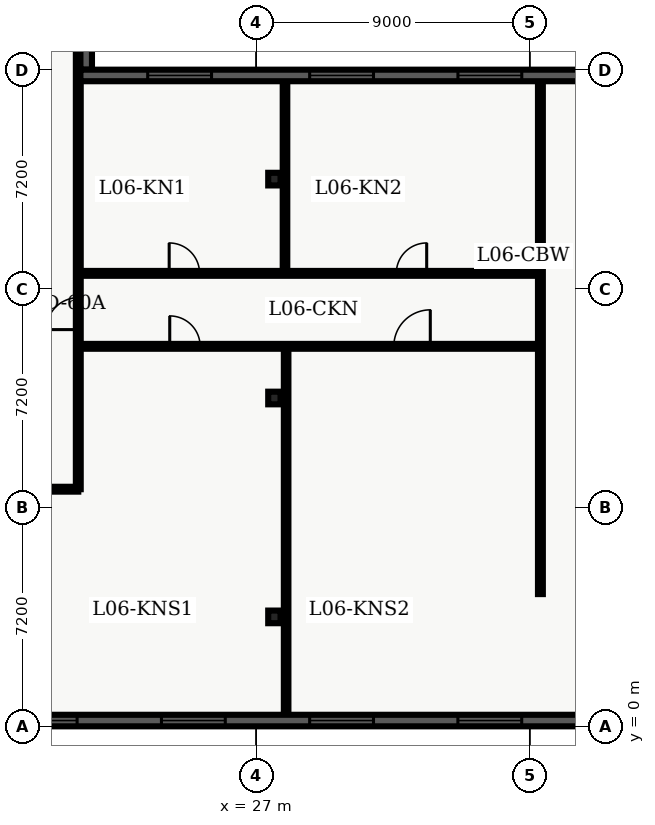
"""IFC4 building model, lengths in metres.
Left out: names, types, materials, properties, quantities, classifications, styles, units other than length and angle.
Written with IfcOpenShell. Run it as: python <this file> out.ifc"""

import sys

from ifc_helpers import new_model, entity, si_unit, converted_unit, direction, frame, origin_with_axes, origin_2d_with_axis, place, context, subcontext, project, spatial, polyline, rectangle, i_section, outline, extrude, element, fill, save


model = new_model("IFC4")
c1 = context("Model", 3, precision=1e-05, world=origin_with_axes(), true_north=direction((0.0, 1.0)))
c2 = subcontext(c1, "Body", "Model", "MODEL_VIEW")
j1 = project(units=[si_unit("LENGTHUNIT", "METRE"), converted_unit("PLANEANGLEUNIT", "DEGREE", entity("IfcPlaneAngleMeasure", 0.017), si_unit("PLANEANGLEUNIT", "RADIAN"), dimensions=[0, 0, 0, 0, 0, 0, 0])], contexts=[c1])
p1 = place(None, origin_with_axes())
s1 = spatial("IfcSite", under=j1, at=p1, CompositionType="ELEMENT")
p2 = place(p1, origin_with_axes())
s2 = spatial("IfcBuilding", under=s1, at=p2, CompositionType="ELEMENT")
p3 = place(p2, frame((0.0, 0.0, 28.8), z_axis=(0.0, 0.0, 1.0), x_axis=(1.0, 0.0, 0.0)))
s3 = spatial("IfcBuildingStorey", under=s2, at=p3, CompositionType="ELEMENT", Elevation=28.8)
for number, where, z_axis, x_axis in (
    (1, (27.6, 3.6, 0.0), (0.0, 0.0, 1.0), (1.0, 0.0, 0.0)),
    (2, (27.6, 10.8, 0.0), (0.0, 0.0, 1.0), (1.0, 0.0, 0.0)),
    (3, (27.6, 18.0, 0.0), (0.0, 0.0, 1.0), (1.0, 0.0, 0.0)),
):
    element("IfcColumn", number, at=place(p3, frame(where, z_axis=z_axis, x_axis=x_axis)), inside=s3, PredefinedType="COLUMN", context=c2, shape_type="SweptSolid", body=[
        extrude(i_section(OverallWidth=0.406, OverallDepth=0.416, WebThickness=0.03, FlangeThickness=0.048, FilletRadius=0.022, at=origin_2d_with_axis()), origin_with_axes(), (0.0, 0.0, 1.0), 3.9),
    ])
p4 = place(p3, frame((2.6, 7.8, 0.0), z_axis=(0.0, 0.0, 1.0), x_axis=(1.0, 0.0, 0.0)))
e4 = element("IfcWall", 4, at=p4, inside=s3, PredefinedType="PARTITIONING", context=c2, shape_type="SweptSolid", body=[
    extrude(outline(polyline([(0.0, -0.08), (18.55, -0.08), (18.55, 0.08), (0.0, 0.08), (0.0, -0.08)])), origin_with_axes(), (0.0, 0.0, 1.0), 2.7),
])
p5 = place(p4, frame((3.765, 0.0, 0.0), z_axis=(0.0, 0.0, 1.0), x_axis=(1.0, 0.0, 0.0)))
e5 = element("IfcOpeningElement", 5, at=p5, cuts=e4, PredefinedType="OPENING", context=c2, shape_type="SweptSolid", body=[
    extrude(rectangle(XDim=1.0, YDim=0.18, at=origin_2d_with_axis()), origin_with_axes(), (0.0, 0.0, 1.0), 2.15),
])
p6 = place(p4, frame((13.3, 0.0, 0.0), z_axis=(0.0, 0.0, 1.0), x_axis=(1.0, 0.0, 0.0)))
e6 = element("IfcOpeningElement", 6, at=p6, cuts=e4, PredefinedType="OPENING", context=c2, shape_type="SweptSolid", body=[
    extrude(rectangle(XDim=1.0, YDim=0.18, at=origin_2d_with_axis()), origin_with_axes(), (0.0, 0.0, 1.0), 2.15),
])
p7 = place(p3, frame((21.15, 7.8, 0.0), z_axis=(0.0, 0.0, 1.0), x_axis=(0.0, 1.0, 0.0)))
e7 = element("IfcWall", 7, at=p7, inside=s3, PredefinedType="PARTITIONING", context=c2, shape_type="SweptSolid", body=[
    extrude(outline(polyline([(0.0, -0.08), (30.2, -0.08), (30.2, 0.08), (0.0, 0.08), (0.0, -0.08)])), origin_with_axes(), (0.0, 0.0, 1.0), 2.7),
])
p8 = place(p7, frame((5.775, 0.0, 0.0), z_axis=(0.0, 0.0, 1.0), x_axis=(1.0, 0.0, 0.0)))
e8 = element("IfcOpeningElement", 8, at=p8, cuts=e7, PredefinedType="OPENING", context=c2, shape_type="SweptSolid", body=[
    extrude(rectangle(XDim=1.05, YDim=0.18, at=origin_2d_with_axis()), origin_with_axes(), (0.0, 0.0, 1.0), 2.15),
])
p9 = place(p3, frame((21.15, 12.5, 0.0), z_axis=(0.0, 0.0, 1.0), x_axis=(1.0, 0.0, 0.0)))
e9 = element("IfcWall", 9, at=p9, inside=s3, PredefinedType="PARTITIONING", context=c2, shape_type="SweptSolid", body=[
    extrude(outline(polyline([(0.0, -0.08), (15.2, -0.08), (15.2, 0.08), (0.0, 0.08), (0.0, -0.08)])), origin_with_axes(), (0.0, 0.0, 1.0), 2.7),
])
p10 = place(p9, frame((3.508, 0.0, 0.0), z_axis=(0.0, 0.0, 1.0), x_axis=(1.0, 0.0, 0.0)))
e10 = element("IfcOpeningElement", 10, at=p10, cuts=e9, PredefinedType="OPENING", context=c2, shape_type="SweptSolid", body=[
    extrude(rectangle(XDim=1.0, YDim=0.18, at=origin_2d_with_axis()), origin_with_axes(), (0.0, 0.0, 1.0), 2.15),
])
p11 = place(p9, frame((10.978, 0.0, 0.0), z_axis=(0.0, 0.0, 1.0), x_axis=(1.0, 0.0, 0.0)))
e11 = element("IfcOpeningElement", 11, at=p11, cuts=e9, PredefinedType="OPENING", context=c2, shape_type="SweptSolid", body=[
    extrude(rectangle(XDim=1.2, YDim=0.18, at=origin_2d_with_axis()), origin_with_axes(), (0.0, 0.0, 1.0), 2.2),
])
p12 = place(p3, frame((21.15, 14.9, 0.0), z_axis=(0.0, 0.0, 1.0), x_axis=(1.0, 0.0, 0.0)))
e12 = element("IfcWall", 12, at=p12, inside=s3, PredefinedType="PARTITIONING", context=c2, shape_type="SweptSolid", body=[
    extrude(outline(polyline([(0.0, -0.08), (15.2, -0.08), (15.2, 0.08), (0.0, 0.08), (0.0, -0.08)])), origin_with_axes(), (0.0, 0.0, 1.0), 2.7),
])
p13 = place(p12, frame((3.49, 0.0, 0.0), z_axis=(0.0, 0.0, 1.0), x_axis=(1.0, 0.0, 0.0)))
e13 = element("IfcOpeningElement", 13, at=p13, cuts=e12, PredefinedType="OPENING", context=c2, shape_type="SweptSolid", body=[
    extrude(rectangle(XDim=1.0, YDim=0.18, at=origin_2d_with_axis()), origin_with_axes(), (0.0, 0.0, 1.0), 2.15),
])
p14 = place(p12, frame((10.96, 0.0, 0.0), z_axis=(0.0, 0.0, 1.0), x_axis=(1.0, 0.0, 0.0)))
e14 = element("IfcOpeningElement", 14, at=p14, cuts=e12, PredefinedType="OPENING", context=c2, shape_type="SweptSolid", body=[
    extrude(rectangle(XDim=1.0, YDim=0.18, at=origin_2d_with_axis()), origin_with_axes(), (0.0, 0.0, 1.0), 2.15),
])
p15 = place(p3, frame((36.35, 4.35, 0.0), z_axis=(0.0, 0.0, 1.0), x_axis=(0.0, 1.0, 0.0)))
e15 = element("IfcWall", 15, at=p15, inside=s3, PredefinedType="PARTITIONING", context=c2, shape_type="SweptSolid", body=[
    extrude(outline(polyline([(0.0, -0.08), (16.95, -0.08), (16.95, 0.08), (0.0, 0.08), (0.0, -0.08)])), origin_with_axes(), (0.0, 0.0, 1.0), 2.7),
])
p16 = place(p3, frame((27.986, 0.36, 0.0), z_axis=(0.0, 0.0, 1.0), x_axis=(0.0, 1.0, 0.0)))
e16 = element("IfcWall", 16, at=p16, inside=s3, PredefinedType="PARTITIONING", context=c2, shape_type="SweptSolid", body=[
    extrude(outline(polyline([(0.0, -0.075), (12.02, -0.075), (12.02, 0.075), (0.0, 0.075), (0.0, -0.075)])), origin_with_axes(), (0.0, 0.0, 1.0), 2.7),
])
p17 = place(p3, frame((27.949, 15.02, 0.0), z_axis=(0.0, 0.0, 1.0), x_axis=(0.0, 1.0, 0.0)))
e17 = element("IfcWall", 17, at=p17, inside=s3, PredefinedType="PARTITIONING", context=c2, shape_type="SweptSolid", body=[
    extrude(outline(polyline([(0.0, -0.075), (6.205, -0.075), (6.205, 0.075), (0.0, 0.075), (0.0, -0.075)])), origin_with_axes(), (0.0, 0.0, 1.0), 2.7),
])
p18 = place(p3, frame((57.22, 0.19, 0.0), z_axis=(0.0, 0.0, 1.0), x_axis=(-1.0, 0.0, 0.0)))
e18 = element("IfcWall", 18, at=p18, inside=s3, PredefinedType="SOLIDWALL", context=c2, shape_type="SweptSolid", body=[
    extrude(outline(polyline([(0.0, -0.19), (54.82, -0.19), (54.82, 0.19), (0.0, 0.19), (0.0, -0.19)])), origin_with_axes(), (0.0, 0.0, 1.0), 3.66),
])
p19 = place(p18, frame((3.037, 0.0, 0.45), z_axis=(0.0, 0.0, 1.0), x_axis=(1.0, 0.0, 0.0)))
e19 = element("IfcOpeningElement", 19, at=p19, cuts=e18, PredefinedType="OPENING", context=c2, shape_type="SweptSolid", body=[
    extrude(rectangle(XDim=2.1, YDim=0.4, at=origin_2d_with_axis()), origin_with_axes(), (0.0, 0.0, 1.0), 2.2),
])
p20 = place(p18, frame((7.912, 0.0, 0.45), z_axis=(0.0, 0.0, 1.0), x_axis=(1.0, 0.0, 0.0)))
e20 = element("IfcOpeningElement", 20, at=p20, cuts=e18, PredefinedType="OPENING", context=c2, shape_type="SweptSolid", body=[
    extrude(rectangle(XDim=2.1, YDim=0.4, at=origin_2d_with_axis()), origin_with_axes(), (0.0, 0.0, 1.0), 2.2),
])
p21 = place(p18, frame((12.786, 0.0, 0.45), z_axis=(0.0, 0.0, 1.0), x_axis=(1.0, 0.0, 0.0)))
e21 = element("IfcOpeningElement", 21, at=p21, cuts=e18, PredefinedType="OPENING", context=c2, shape_type="SweptSolid", body=[
    extrude(rectangle(XDim=2.1, YDim=0.4, at=origin_2d_with_axis()), origin_with_axes(), (0.0, 0.0, 1.0), 2.2),
])
p22 = place(p18, frame((17.661, 0.0, 0.45), z_axis=(0.0, 0.0, 1.0), x_axis=(1.0, 0.0, 0.0)))
e22 = element("IfcOpeningElement", 22, at=p22, cuts=e18, PredefinedType="OPENING", context=c2, shape_type="SweptSolid", body=[
    extrude(rectangle(XDim=2.1, YDim=0.4, at=origin_2d_with_axis()), origin_with_axes(), (0.0, 0.0, 1.0), 2.2),
])
p23 = place(p18, frame((22.535, 0.0, 0.45), z_axis=(0.0, 0.0, 1.0), x_axis=(1.0, 0.0, 0.0)))
e23 = element("IfcOpeningElement", 23, at=p23, cuts=e18, PredefinedType="OPENING", context=c2, shape_type="SweptSolid", body=[
    extrude(rectangle(XDim=2.1, YDim=0.4, at=origin_2d_with_axis()), origin_with_axes(), (0.0, 0.0, 1.0), 2.2),
])
p24 = place(p18, frame((27.41, 0.0, 0.45), z_axis=(0.0, 0.0, 1.0), x_axis=(1.0, 0.0, 0.0)))
e24 = element("IfcOpeningElement", 24, at=p24, cuts=e18, PredefinedType="OPENING", context=c2, shape_type="SweptSolid", body=[
    extrude(rectangle(XDim=2.1, YDim=0.4, at=origin_2d_with_axis()), origin_with_axes(), (0.0, 0.0, 1.0), 2.2),
])
p25 = place(p18, frame((32.285, 0.0, 0.45), z_axis=(0.0, 0.0, 1.0), x_axis=(1.0, 0.0, 0.0)))
e25 = element("IfcOpeningElement", 25, at=p25, cuts=e18, PredefinedType="OPENING", context=c2, shape_type="SweptSolid", body=[
    extrude(rectangle(XDim=2.1, YDim=0.4, at=origin_2d_with_axis()), origin_with_axes(), (0.0, 0.0, 1.0), 2.2),
])
p26 = place(p18, frame((37.159, 0.0, 0.45), z_axis=(0.0, 0.0, 1.0), x_axis=(1.0, 0.0, 0.0)))
e26 = element("IfcOpeningElement", 26, at=p26, cuts=e18, PredefinedType="OPENING", context=c2, shape_type="SweptSolid", body=[
    extrude(rectangle(XDim=2.1, YDim=0.4, at=origin_2d_with_axis()), origin_with_axes(), (0.0, 0.0, 1.0), 2.2),
])
p27 = place(p18, frame((42.034, 0.0, 0.45), z_axis=(0.0, 0.0, 1.0), x_axis=(1.0, 0.0, 0.0)))
e27 = element("IfcOpeningElement", 27, at=p27, cuts=e18, PredefinedType="OPENING", context=c2, shape_type="SweptSolid", body=[
    extrude(rectangle(XDim=2.1, YDim=0.4, at=origin_2d_with_axis()), origin_with_axes(), (0.0, 0.0, 1.0), 2.2),
])
p28 = place(p18, frame((51.783, 0.0, 0.45), z_axis=(0.0, 0.0, 1.0), x_axis=(1.0, 0.0, 0.0)))
e28 = element("IfcOpeningElement", 28, at=p28, cuts=e18, PredefinedType="OPENING", context=c2, shape_type="SweptSolid", body=[
    extrude(rectangle(XDim=2.1, YDim=0.4, at=origin_2d_with_axis()), origin_with_axes(), (0.0, 0.0, 1.0), 2.2),
])
p29 = place(p3, frame((21.41, 45.82, 0.0), z_axis=(0.0, 0.0, 1.0), x_axis=(0.0, -1.0, 0.0)))
e29 = element("IfcWall", 29, at=p29, inside=s3, PredefinedType="SOLIDWALL", context=c2, shape_type="SweptSolid", body=[
    extrude(outline(polyline([(0.0, -0.19), (24.22, -0.19), (24.22, 0.19), (0.0, 0.19), (0.0, -0.19)])), origin_with_axes(), (0.0, 0.0, 1.0), 3.66),
])
p30 = place(p29, frame((6.57, 0.0, 0.0), z_axis=(0.0, 0.0, 1.0), x_axis=(1.0, 0.0, 0.0)))
e30 = element("IfcOpeningElement", 30, at=p30, cuts=e29, PredefinedType="OPENING", context=c2, shape_type="SweptSolid", body=[
    extrude(rectangle(XDim=1.6, YDim=0.4, at=origin_2d_with_axis()), origin_with_axes(), (0.0, 0.0, 1.0), 2.2),
])
p31 = place(p29, frame((2.902, 0.0, 0.45), z_axis=(0.0, 0.0, 1.0), x_axis=(1.0, 0.0, 0.0)))
e31 = element("IfcOpeningElement", 31, at=p31, cuts=e29, PredefinedType="OPENING", context=c2, shape_type="SweptSolid", body=[
    extrude(rectangle(XDim=2.1, YDim=0.4, at=origin_2d_with_axis()), origin_with_axes(), (0.0, 0.0, 1.0), 2.2),
])
p32 = place(p3, frame((21.22, 21.41, 0.0), z_axis=(0.0, 0.0, 1.0), x_axis=(1.0, 0.0, 0.0)))
e32 = element("IfcWall", 32, at=p32, inside=s3, PredefinedType="SOLIDWALL", context=c2, shape_type="SweptSolid", body=[
    extrude(outline(polyline([(0.0, -0.19), (17.18, -0.19), (17.18, 0.19), (0.0, 0.19), (0.0, -0.19)])), origin_with_axes(), (0.0, 0.0, 1.0), 3.66),
])
p33 = place(p32, frame((3.263, 0.0, 0.45), z_axis=(0.0, 0.0, 1.0), x_axis=(1.0, 0.0, 0.0)))
e33 = element("IfcOpeningElement", 33, at=p33, cuts=e32, PredefinedType="OPENING", context=c2, shape_type="SweptSolid", body=[
    extrude(rectangle(XDim=2.1, YDim=0.4, at=origin_2d_with_axis()), origin_with_axes(), (0.0, 0.0, 1.0), 2.2),
])
p34 = place(p32, frame((8.59, 0.0, 0.45), z_axis=(0.0, 0.0, 1.0), x_axis=(1.0, 0.0, 0.0)))
e34 = element("IfcOpeningElement", 34, at=p34, cuts=e32, PredefinedType="OPENING", context=c2, shape_type="SweptSolid", body=[
    extrude(rectangle(XDim=2.1, YDim=0.4, at=origin_2d_with_axis()), origin_with_axes(), (0.0, 0.0, 1.0), 2.2),
])
p35 = place(p32, frame((13.467, 0.0, 0.45), z_axis=(0.0, 0.0, 1.0), x_axis=(1.0, 0.0, 0.0)))
e35 = element("IfcOpeningElement", 35, at=p35, cuts=e32, PredefinedType="OPENING", context=c2, shape_type="SweptSolid", body=[
    extrude(rectangle(XDim=2.1, YDim=0.4, at=origin_2d_with_axis()), origin_with_axes(), (0.0, 0.0, 1.0), 2.2),
])
p36 = place(p7, frame((5.775, 0.0, 0.0), z_axis=(0.0, 0.0, 1.0), x_axis=(1.0, 0.0, 0.0)))
e36 = element("IfcDoor", 36, at=p36, inside=s3, OperationType="SINGLE_SWING_LEFT", PredefinedType="DOOR", context=c2, shape_type="SweptSolid", body=[
    extrude(rectangle(XDim=1.05, YDim=0.09, at=origin_2d_with_axis()), origin_with_axes(), (0.0, 0.0, 1.0), 2.15),
])
fill(e8, e36)
p37 = place(p9, frame((3.508, 0.0, 0.0), z_axis=(0.0, 0.0, 1.0), x_axis=(1.0, 0.0, 0.0)))
e37 = element("IfcDoor", 37, at=p37, inside=s3, OperationType="SINGLE_SWING_LEFT", PredefinedType="DOOR", context=c2, shape_type="SweptSolid", body=[
    extrude(rectangle(XDim=1.0, YDim=0.09, at=origin_2d_with_axis()), origin_with_axes(), (0.0, 0.0, 1.0), 2.15),
])
fill(e10, e37)
p38 = place(p9, frame((10.978, 0.0, 0.0), z_axis=(0.0, 0.0, 1.0), x_axis=(1.0, 0.0, 0.0)))
e38 = element("IfcDoor", 38, at=p38, inside=s3, OperationType="SINGLE_SWING_RIGHT", PredefinedType="DOOR", context=c2, shape_type="SweptSolid", body=[
    extrude(rectangle(XDim=1.2, YDim=0.09, at=origin_2d_with_axis()), origin_with_axes(), (0.0, 0.0, 1.0), 2.2),
])
fill(e11, e38)
p39 = place(p12, frame((3.49, 0.0, 0.0), z_axis=(0.0, 0.0, 1.0), x_axis=(1.0, 0.0, 0.0)))
e39 = element("IfcDoor", 39, at=p39, inside=s3, OperationType="SINGLE_SWING_LEFT", PredefinedType="DOOR", context=c2, shape_type="SweptSolid", body=[
    extrude(rectangle(XDim=1.0, YDim=0.09, at=origin_2d_with_axis()), origin_with_axes(), (0.0, 0.0, 1.0), 2.15),
])
fill(e13, e39)
p40 = place(p12, frame((10.96, 0.0, 0.0), z_axis=(0.0, 0.0, 1.0), x_axis=(1.0, 0.0, 0.0)))
e40 = element("IfcDoor", 40, at=p40, inside=s3, OperationType="SINGLE_SWING_RIGHT", PredefinedType="DOOR", context=c2, shape_type="SweptSolid", body=[
    extrude(rectangle(XDim=1.0, YDim=0.09, at=origin_2d_with_axis()), origin_with_axes(), (0.0, 0.0, 1.0), 2.15),
])
fill(e14, e40)
p41 = place(p18, frame((22.535, 0.0, 0.45), z_axis=(0.0, 0.0, 1.0), x_axis=(1.0, 0.0, 0.0)))
e41 = element("IfcWindow", 41, at=p41, inside=s3, PredefinedType="WINDOW", context=c2, shape_type="SweptSolid", body=[
    extrude(rectangle(XDim=2.1, YDim=0.09, at=origin_2d_with_axis()), origin_with_axes(), (0.0, 0.0, 1.0), 2.2),
])
fill(e23, e41)
p42 = place(p18, frame((27.41, 0.0, 0.45), z_axis=(0.0, 0.0, 1.0), x_axis=(1.0, 0.0, 0.0)))
e42 = element("IfcWindow", 42, at=p42, inside=s3, PredefinedType="WINDOW", context=c2, shape_type="SweptSolid", body=[
    extrude(rectangle(XDim=2.1, YDim=0.09, at=origin_2d_with_axis()), origin_with_axes(), (0.0, 0.0, 1.0), 2.2),
])
fill(e24, e42)
p43 = place(p18, frame((32.285, 0.0, 0.45), z_axis=(0.0, 0.0, 1.0), x_axis=(1.0, 0.0, 0.0)))
e43 = element("IfcWindow", 43, at=p43, inside=s3, PredefinedType="WINDOW", context=c2, shape_type="SweptSolid", body=[
    extrude(rectangle(XDim=2.1, YDim=0.09, at=origin_2d_with_axis()), origin_with_axes(), (0.0, 0.0, 1.0), 2.2),
])
fill(e25, e43)
p44 = place(p18, frame((37.159, 0.0, 0.45), z_axis=(0.0, 0.0, 1.0), x_axis=(1.0, 0.0, 0.0)))
e44 = element("IfcWindow", 44, at=p44, inside=s3, PredefinedType="WINDOW", context=c2, shape_type="SweptSolid", body=[
    extrude(rectangle(XDim=2.1, YDim=0.09, at=origin_2d_with_axis()), origin_with_axes(), (0.0, 0.0, 1.0), 2.2),
])
fill(e26, e44)
p45 = place(p32, frame((3.263, 0.0, 0.45), z_axis=(0.0, 0.0, 1.0), x_axis=(1.0, 0.0, 0.0)))
e45 = element("IfcWindow", 45, at=p45, inside=s3, PredefinedType="WINDOW", context=c2, shape_type="SweptSolid", body=[
    extrude(rectangle(XDim=2.1, YDim=0.09, at=origin_2d_with_axis()), origin_with_axes(), (0.0, 0.0, 1.0), 2.2),
])
fill(e33, e45)
p46 = place(p32, frame((8.59, 0.0, 0.45), z_axis=(0.0, 0.0, 1.0), x_axis=(1.0, 0.0, 0.0)))
e46 = element("IfcWindow", 46, at=p46, inside=s3, PredefinedType="WINDOW", context=c2, shape_type="SweptSolid", body=[
    extrude(rectangle(XDim=2.1, YDim=0.09, at=origin_2d_with_axis()), origin_with_axes(), (0.0, 0.0, 1.0), 2.2),
])
fill(e34, e46)
p47 = place(p32, frame((13.467, 0.0, 0.45), z_axis=(0.0, 0.0, 1.0), x_axis=(1.0, 0.0, 0.0)))
e47 = element("IfcWindow", 47, at=p47, inside=s3, PredefinedType="WINDOW", context=c2, shape_type="SweptSolid", body=[
    extrude(rectangle(XDim=2.1, YDim=0.09, at=origin_2d_with_axis()), origin_with_axes(), (0.0, 0.0, 1.0), 2.2),
])
fill(e35, e47)
save(model, sys.argv[1])
